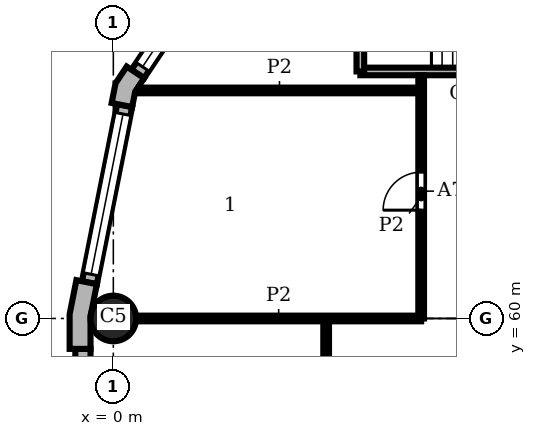
"""IFC4 building model, lengths in metres.
Left out: names, types, materials, properties, quantities, classifications, styles, units other than length and angle.
Written with IfcOpenShell. Run it as: python <this file> out.ifc"""

import sys

from ifc_helpers import new_model, si_unit, direction, frame, frame_2d, origin, origin_2d, place, context, subcontext, project, spatial, polyline, rectangle, circle, outline, extrude, element, fill, save


model = new_model("IFC4")
c1 = context("Model", 3, precision=1e-05, world=origin(), true_north=direction((0.0, 1.0)))
c2 = subcontext(c1, "Body", "Model", "MODEL_VIEW")
j1 = project(units=[si_unit("LENGTHUNIT", "METRE"), si_unit("PLANEANGLEUNIT", "RADIAN")], contexts=[c1])
p1 = place(None, origin())
s1 = spatial("IfcSite", under=j1, at=p1, CompositionType="ELEMENT")
p2 = place(p1, origin())
s2 = spatial("IfcBuilding", under=s1, at=p2, CompositionType="ELEMENT")
p3 = place(p2, frame((0.0, 0.0, 82.2)))
s3 = spatial("IfcBuildingStorey", under=s2, at=p3, CompositionType="ELEMENT", Elevation=82.2)
p4 = place(p3, frame((0.0, 60.0, 0.0), z_axis=(0.0, 0.0, 1.0), x_axis=(1.0, 0.0, 0.0)))
e1 = element("IfcColumn", 1, at=p4, inside=s3, PredefinedType="COLUMN", context=c2, shape_type="SweptSolid", body=[
    extrude(circle(Radius=0.6, at=origin_2d()), origin(), (0.0, 0.0, 1.0), 3.9),
])
p5 = place(p3, origin())
e2 = element("IfcWall", 2, at=p5, inside=s3, PredefinedType="SOLIDWALL", context=c2, shape_type="SweptSolid", body=[
    extrude(outline(polyline([(0.477, 66.545), (0.352, 66.629), (0.059, 66.189), (-0.045, 65.67), (0.103, 65.641), (0.495, 65.563), (0.577, 65.974), (0.81, 66.323), (0.477, 66.545)])), origin(), (0.0, 0.0, 1.0), 3.9),
])
e3 = element("IfcWall", 3, at=p5, inside=s3, PredefinedType="SOLIDWALL", context=c2, shape_type="SweptSolid", body=[
    extrude(outline(polyline([(-0.825, 60.98), (-0.972, 61.009), (-1.15, 60.113), (-1.15, 59.2), (-1.0, 59.2), (-0.6, 59.2), (-0.6, 60.059), (-0.432, 60.902), (-0.825, 60.98)])), origin(), (0.0, 0.0, 1.0), 3.9),
])
p6 = place(p3, frame((3.284, 70.386, 0.0), z_axis=(0.0, 0.0, 1.0), x_axis=(-0.555541552266, -0.831488775454, 0.0)))
e4 = element("IfcWall", 4, at=p6, inside=s3, PredefinedType="SOLIDWALL", context=c2, shape_type="SweptSolid", body=[
    extrude(rectangle(XDim=4.753, YDim=0.4, at=frame_2d((2.376, 0.0))), origin(), (0.0, 0.0, 1.0), 3.9),
])
p7 = place(p6, frame((0.226, 0.0, 0.9)))
e5 = element("IfcOpeningElement", 5, at=p7, cuts=e4, PredefinedType="OPENING", context=c2, shape_type="SweptSolid", body=[
    extrude(rectangle(XDim=4.3, YDim=2.35, at=frame_2d((2.15, 1.175))), frame((0.0, 0.21, 0.0), z_axis=(0.0, -1.0, 0.0), x_axis=(1.0, 0.0, 0.0)), (0.0, 0.0, 1.0), 0.42),
])
p8 = place(p3, frame((0.299, 65.602, 0.0), z_axis=(0.0, 0.0, 1.0), x_axis=(-0.195098533057, -0.98078364709, 0.0)))
e6 = element("IfcWall", 6, at=p8, inside=s3, PredefinedType="SOLIDWALL", context=c2, shape_type="SweptSolid", body=[
    extrude(rectangle(XDim=4.753, YDim=0.4, at=frame_2d((2.376, 0.0))), origin(), (0.0, 0.0, 1.0), 3.9),
])
p9 = place(p8, frame((0.226, 0.0, 0.9)))
e7 = element("IfcOpeningElement", 7, at=p9, cuts=e6, PredefinedType="OPENING", context=c2, shape_type="SweptSolid", body=[
    extrude(rectangle(XDim=4.3, YDim=2.35, at=frame_2d((2.15, 1.175))), frame((0.0, 0.21, 0.0), z_axis=(0.0, -1.0, 0.0), x_axis=(1.0, 0.0, 0.0)), (0.0, 0.0, 1.0), 0.42),
])
p10 = place(p3, frame((-0.8, 59.2, 0.0), z_axis=(0.0, 0.0, 1.0), x_axis=(0.0, -1.0, 0.0)))
e8 = element("IfcWall", 8, at=p10, inside=s3, PredefinedType="SOLIDWALL", context=c2, shape_type="SweptSolid", body=[
    extrude(rectangle(XDim=18.4, YDim=0.4, at=frame_2d((9.2, 0.0))), origin(), (0.0, 0.0, 1.0), 3.9),
])
p11 = place(p10, frame((3.75, 0.0, 0.9)))
e9 = element("IfcOpeningElement", 9, at=p11, cuts=e8, PredefinedType="OPENING", context=c2, shape_type="SweptSolid", body=[
    extrude(rectangle(XDim=0.9, YDim=2.35, at=frame_2d((0.45, 1.175))), frame((0.0, 0.21, 0.0), z_axis=(0.0, -1.0, 0.0), x_axis=(1.0, 0.0, 0.0)), (0.0, 0.0, 1.0), 0.42),
])
p12 = place(p10, frame((13.75, 0.0, 0.9)))
e10 = element("IfcOpeningElement", 10, at=p12, cuts=e8, PredefinedType="OPENING", context=c2, shape_type="SweptSolid", body=[
    extrude(rectangle(XDim=0.9, YDim=2.35, at=frame_2d((0.45, 1.175))), frame((0.0, 0.21, 0.0), z_axis=(0.0, -1.0, 0.0), x_axis=(1.0, 0.0, 0.0)), (0.0, 0.0, 1.0), 0.42),
])
p13 = place(p3, frame((6.5, 66.5, 0.0), z_axis=(0.0, 0.0, 1.0), x_axis=(1.0, 0.0, 0.0)))
e11 = element("IfcWall", 11, at=p13, inside=s3, PredefinedType="SHEAR", context=c2, shape_type="SweptSolid", body=[
    extrude(rectangle(XDim=6.6, YDim=0.2, at=frame_2d((3.3, 0.0))), origin(), (0.0, 0.0, 1.0), 3.58),
])
p14 = place(p13, frame((5.225, 0.0, 0.0)))
e12 = element("IfcOpeningElement", 12, at=p14, cuts=e11, PredefinedType="OPENING", context=c2, shape_type="SweptSolid", body=[
    extrude(rectangle(XDim=1.0, YDim=2.1, at=frame_2d((0.5, 1.05))), frame((0.0, 0.11, 0.0), z_axis=(0.0, -1.0, 0.0), x_axis=(1.0, 0.0, 0.0)), (0.0, 0.0, 1.0), 0.22),
])
p15 = place(p3, frame((6.5, 66.5, 0.0), z_axis=(0.0, 0.0, 1.0), x_axis=(0.0, 1.0, 0.0)))
e13 = element("IfcWall", 13, at=p15, inside=s3, PredefinedType="SHEAR", context=c2, shape_type="SweptSolid", body=[
    extrude(rectangle(XDim=3.3, YDim=0.2, at=frame_2d((1.65, 0.0))), origin(), (0.0, 0.0, 1.0), 3.58),
])
p16 = place(p3, frame((5.6, 5.6, 0.0), z_axis=(0.0, 0.0, 1.0), x_axis=(0.0, 1.0, 0.0)))
e14 = element("IfcWall", 14, at=p16, inside=s3, PredefinedType="PARTITIONING", context=c2, shape_type="SweptSolid", body=[
    extrude(rectangle(XDim=54.4, YDim=0.15, at=frame_2d((27.2, 0.0))), origin(), (0.0, 0.0, 1.0), 3.58),
])
p17 = place(p16, frame((40.8, 0.0, 0.0)))
e15 = element("IfcOpeningElement", 15, at=p17, cuts=e14, PredefinedType="OPENING", context=c2, shape_type="SweptSolid", body=[
    extrude(rectangle(XDim=1.8, YDim=2.1, at=frame_2d((0.9, 1.05))), frame((0.0, 0.085, 0.0), z_axis=(0.0, -1.0, 0.0), x_axis=(1.0, 0.0, 0.0)), (0.0, 0.0, 1.0), 0.17),
])
p18 = place(p3, frame((8.1, 60.0, 0.0), z_axis=(0.0, 0.0, 1.0), x_axis=(0.0, 1.0, 0.0)))
e16 = element("IfcWall", 16, at=p18, inside=s3, PredefinedType="PARTITIONING", context=c2, shape_type="SweptSolid", body=[
    extrude(rectangle(XDim=6.4, YDim=0.15, at=frame_2d((3.2, 0.0))), origin(), (0.0, 0.0, 1.0), 3.58),
])
p19 = place(p18, frame((2.85, 0.0, 0.0)))
e17 = element("IfcOpeningElement", 17, at=p19, cuts=e16, PredefinedType="OPENING", context=c2, shape_type="SweptSolid", body=[
    extrude(rectangle(XDim=1.0, YDim=2.1, at=frame_2d((0.5, 1.05))), frame((0.0, 0.085, 0.0), z_axis=(0.0, -1.0, 0.0), x_axis=(1.0, 0.0, 0.0)), (0.0, 0.0, 1.0), 0.17),
])
p20 = place(p3, frame((0.6, 60.0, 0.0), z_axis=(0.0, 0.0, 1.0), x_axis=(1.0, 0.0, 0.0)))
e18 = element("IfcWall", 18, at=p20, inside=s3, PredefinedType="PARTITIONING", context=c2, shape_type="SweptSolid", body=[
    extrude(rectangle(XDim=7.5, YDim=0.15, at=frame_2d((3.75, 0.0))), origin(), (0.0, 0.0, 1.0), 3.58),
])
p21 = place(p3, frame((0.644, 66.0, 0.0), z_axis=(0.0, 0.0, 1.0), x_axis=(1.0, 0.0, 0.0)))
e19 = element("IfcWall", 19, at=p21, inside=s3, PredefinedType="PARTITIONING", context=c2, shape_type="SweptSolid", body=[
    extrude(rectangle(XDim=7.456, YDim=0.15, at=frame_2d((3.728, 0.0))), origin(), (0.0, 0.0, 1.0), 3.58),
])
p22 = place(p7, origin())
e20 = element("IfcWindow", 20, at=p22, inside=s3, PartitioningType="SINGLE_PANEL", PredefinedType="WINDOW", context=c2, shape_type="SweptSolid", body=[
    extrude(rectangle(XDim=4.3, YDim=2.35, at=frame_2d((2.15, 1.175))), frame((0.0, 0.16, 0.0), z_axis=(0.0, -1.0, 0.0), x_axis=(1.0, 0.0, 0.0)), (0.0, 0.0, 1.0), 0.06),
])
fill(e5, e20)
p23 = place(p9, origin())
e21 = element("IfcWindow", 21, at=p23, inside=s3, PartitioningType="SINGLE_PANEL", PredefinedType="WINDOW", context=c2, shape_type="SweptSolid", body=[
    extrude(rectangle(XDim=4.3, YDim=2.35, at=frame_2d((2.15, 1.175))), frame((0.0, 0.16, 0.0), z_axis=(0.0, -1.0, 0.0), x_axis=(1.0, 0.0, 0.0)), (0.0, 0.0, 1.0), 0.06),
])
fill(e7, e21)
p24 = place(p19, origin())
e22 = element("IfcDoor", 22, at=p24, inside=s3, OperationType="SINGLE_SWING_LEFT", PredefinedType="DOOR", context=c2, shape_type="SweptSolid", body=[
    extrude(rectangle(XDim=1.0, YDim=2.1, at=frame_2d((0.5, 1.05))), frame((0.0, 0.025, 0.0), z_axis=(0.0, -1.0, 0.0), x_axis=(1.0, 0.0, 0.0)), (0.0, 0.0, 1.0), 0.05),
])
fill(e17, e22)
save(model, sys.argv[1])
